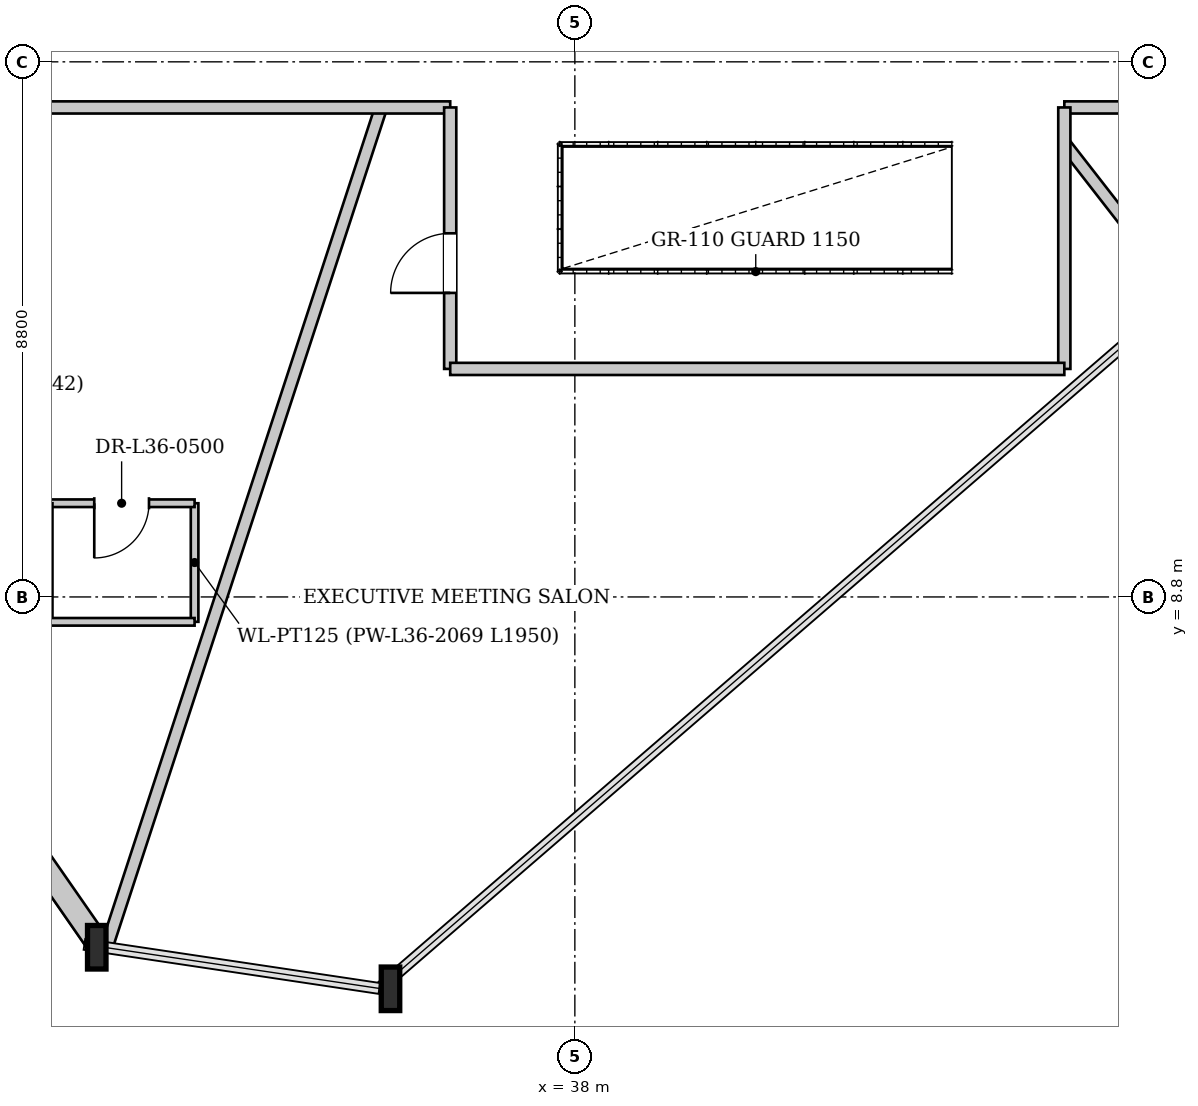
"""IFC4 building model, lengths in metres.
Left out: names, types, materials, properties, quantities, classifications, styles, units other than length and angle.
Written with IfcOpenShell. Run it as: python <this file> out.ifc"""

import sys

from ifc_helpers import new_model, si_unit, direction, frame, frame_2d, origin, origin_2d, place, context, subcontext, project, spatial, rectangle, i_section, extrude, source, transform, mapped, element, fill, save


model = new_model("IFC4")
c1 = context("Model", 3, precision=1e-05, world=origin(), true_north=direction((0.0, 1.0)))
c2 = subcontext(c1, "Body", "Model", "MODEL_VIEW")
j1 = project(units=[si_unit("LENGTHUNIT", "METRE"), si_unit("PLANEANGLEUNIT", "RADIAN")], contexts=[c1])
p1 = place(None, origin())
s1 = spatial("IfcSite", under=j1, at=p1, CompositionType="ELEMENT")
p2 = place(p1, origin())
s2 = spatial("IfcBuilding", under=s1, at=p2, CompositionType="ELEMENT")
p3 = place(p2, frame((0.0, 0.0, 138.1)))
s3 = spatial("IfcBuildingStorey", under=s2, at=p3, CompositionType="ELEMENT", Elevation=138.1)
m1 = source(origin(), c2, "Body", "SweptSolid", [
    extrude(i_section(OverallWidth=0.304, OverallDepth=0.716, WebThickness=0.021, FlangeThickness=0.04, at=origin_2d()), origin(), (0.0, 0.0, 1.0), 3.857),
])
p4 = place(p3, frame((29.934, 3.087, 0.0), z_axis=(0.105061568815, -0.02461984956, 0.99416091744), x_axis=(0.228156573902, 0.973624454184, 0.0)))
e1 = element("IfcColumn", 1, at=p4, inside=s3, PredefinedType="COLUMN", context=c2, shape_type="MappedRepresentation", body=[
    mapped(m1, transform((0.0, 0.0, 0.0), x_axis=(1.0, 0.0, 0.0), y_axis=(0.0, 1.0, 0.0), z_axis=(0.0, 0.0, 1.0), scale=1.0)),
])
m2 = source(origin(), c2, "Body", "SweptSolid", [
    extrude(i_section(OverallWidth=0.304, OverallDepth=0.716, WebThickness=0.021, FlangeThickness=0.04, at=origin_2d()), origin(), (0.0, 0.0, 1.0), 3.852),
])
p5 = place(p3, frame((34.785, 2.362, 0.0), z_axis=(0.094871440027, -0.003105344396, 0.995484689337), x_axis=(0.032714610528, 0.999464733874, 0.0)))
e2 = element("IfcColumn", 2, at=p5, inside=s3, PredefinedType="COLUMN", context=c2, shape_type="MappedRepresentation", body=[
    mapped(m2, transform((0.0, 0.0, 0.0), x_axis=(1.0, 0.0, 0.0), y_axis=(0.0, 1.0, 0.0), z_axis=(0.0, 0.0, 1.0), scale=1.0)),
])
p6 = place(p3, frame((30.09, 3.195, 0.0), z_axis=(0.0, 0.0, 1.0), x_axis=(-0.57033951124, 0.821409058824, 0.0)))
e3 = element("IfcWall", 3, at=p6, inside=s3, PredefinedType="SOLIDWALL", context=c2, shape_type="SweptSolid", body=[
    extrude(rectangle(XDim=18.042, YDim=0.38, at=frame_2d((9.021, 0.0))), origin(), (0.0, 0.0, 1.0), 2.972),
])
p7 = place(p6, frame((3.952, 0.0, 0.602)))
e4 = element("IfcOpeningElement", 4, at=p7, cuts=e3, PredefinedType="OPENING", context=c2, shape_type="SweptSolid", body=[
    extrude(rectangle(XDim=2.2, YDim=2.25, at=frame_2d((1.1, 1.125))), frame((0.0, 0.2, 0.0), z_axis=(0.0, -1.0, 0.0), x_axis=(1.0, 0.0, 0.0)), (0.0, 0.0, 1.0), 0.4),
])
p8 = place(p6, frame((11.89, 0.0, 0.602)))
e5 = element("IfcOpeningElement", 5, at=p8, cuts=e3, PredefinedType="OPENING", context=c2, shape_type="SweptSolid", body=[
    extrude(rectangle(XDim=2.2, YDim=2.25, at=frame_2d((1.1, 1.125))), frame((0.0, 0.2, 0.0), z_axis=(0.0, -1.0, 0.0), x_axis=(1.0, 0.0, 0.0)), (0.0, 0.0, 1.0), 0.4),
])
p9 = place(p3, frame((34.813, 16.85, 0.0), z_axis=(0.0, 0.0, 1.0), x_axis=(-0.31067365158, -0.95051663963, 0.0)))
e6 = element("IfcWall", 6, at=p9, inside=s3, PredefinedType="PARTITIONING", context=c2, shape_type="SweptSolid", body=[
    extrude(rectangle(XDim=14.507, YDim=0.2, at=frame_2d((7.253, 0.0))), origin(), (0.0, 0.0, 1.0), 3.075),
])
p10 = place(p3, frame((46.05, 16.259, 0.0), z_axis=(0.0, 0.0, 1.0), x_axis=(0.614254285098, -0.789108150533, 0.0)))
e7 = element("IfcWall", 7, at=p10, inside=s3, PredefinedType="PARTITIONING", context=c2, shape_type="SweptSolid", body=[
    extrude(rectangle(XDim=3.125, YDim=0.2, at=frame_2d((1.562, 0.0))), origin(), (0.0, 0.0, 1.0), 3.58),
])
p11 = place(p3, frame((31.746, 8.391, 0.0), z_axis=(0.0, 0.0, 1.0), x_axis=(0.0, 1.0, 0.0)))
e8 = element("IfcWall", 8, at=p11, inside=s3, PredefinedType="PARTITIONING", context=c2, shape_type="SweptSolid", body=[
    extrude(rectangle(XDim=1.95, YDim=0.125, at=frame_2d((0.975, 0.0))), origin(), (0.0, 0.0, 1.0), 3.58),
])
p12 = place(p3, frame((31.746, 10.341, 0.0), z_axis=(0.0, 0.0, 1.0), x_axis=(-1.0, 0.0, 0.0)))
e9 = element("IfcWall", 9, at=p12, inside=s3, PredefinedType="PARTITIONING", context=c2, shape_type="SweptSolid", body=[
    extrude(rectangle(XDim=2.4, YDim=0.125, at=frame_2d((1.2, 0.0))), origin(), (0.0, 0.0, 1.0), 3.58),
])
p13 = place(p12, frame((0.75, 0.0, 0.0)))
e10 = element("IfcOpeningElement", 10, at=p13, cuts=e9, PredefinedType="OPENING", context=c2, shape_type="SweptSolid", body=[
    extrude(rectangle(XDim=0.9, YDim=2.1, at=frame_2d((0.45, 1.05))), frame((0.0, 0.073, 0.0), z_axis=(0.0, -1.0, 0.0), x_axis=(1.0, 0.0, 0.0)), (0.0, 0.0, 1.0), 0.145),
])
p14 = place(p3, frame((29.346, 10.341, 0.0), z_axis=(0.0, 0.0, 1.0), x_axis=(0.0, -1.0, 0.0)))
e11 = element("IfcWall", 11, at=p14, inside=s3, PredefinedType="PARTITIONING", context=c2, shape_type="SweptSolid", body=[
    extrude(rectangle(XDim=1.95, YDim=0.125, at=frame_2d((0.975, 0.0))), origin(), (0.0, 0.0, 1.0), 3.58),
])
p15 = place(p3, frame((29.346, 8.391, 0.0), z_axis=(0.0, 0.0, 1.0), x_axis=(1.0, 0.0, 0.0)))
e12 = element("IfcWall", 12, at=p15, inside=s3, PredefinedType="PARTITIONING", context=c2, shape_type="SweptSolid", body=[
    extrude(rectangle(XDim=2.4, YDim=0.125, at=frame_2d((1.2, 0.0))), origin(), (0.0, 0.0, 1.0), 3.58),
])
p16 = place(p3, frame((27.45, 16.85, 0.0), z_axis=(0.0, 0.0, 1.0), x_axis=(1.0, 0.0, 0.0)))
e13 = element("IfcWall", 13, at=p16, inside=s3, PredefinedType="PARTITIONING", context=c2, shape_type="SweptSolid", body=[
    extrude(rectangle(XDim=8.5, YDim=0.2, at=frame_2d((4.25, 0.0))), origin(), (0.0, 0.0, 1.0), 3.58),
])
p17 = place(p16, frame((0.462, 0.0, 0.0)))
e14 = element("IfcOpeningElement", 14, at=p17, cuts=e13, PredefinedType="OPENING", context=c2, shape_type="SweptSolid", body=[
    extrude(rectangle(XDim=0.98, YDim=2.15, at=frame_2d((0.49, 1.075))), frame((0.0, 0.11, 0.0), z_axis=(0.0, -1.0, 0.0), x_axis=(1.0, 0.0, 0.0)), (0.0, 0.0, 1.0), 0.22),
])
p18 = place(p3, frame((46.05, 16.85, 0.0), z_axis=(0.0, 0.0, 1.0), x_axis=(1.0, 0.0, 0.0)))
e15 = element("IfcWall", 15, at=p18, inside=s3, PredefinedType="PARTITIONING", context=c2, shape_type="SweptSolid", body=[
    extrude(rectangle(XDim=2.5, YDim=0.2, at=frame_2d((1.25, 0.0))), origin(), (0.0, 0.0, 1.0), 3.58),
])
p19 = place(p18, frame((1.22, 0.0, 0.0)))
e16 = element("IfcOpeningElement", 16, at=p19, cuts=e15, PredefinedType="OPENING", context=c2, shape_type="SweptSolid", body=[
    extrude(rectangle(XDim=0.98, YDim=2.15, at=frame_2d((0.49, 1.075))), frame((0.0, 0.11, 0.0), z_axis=(0.0, -1.0, 0.0), x_axis=(1.0, 0.0, 0.0)), (0.0, 0.0, 1.0), 0.22),
])
p20 = place(p3, frame((35.95, 12.55, 0.0), z_axis=(0.0, 0.0, 1.0), x_axis=(0.0, 1.0, 0.0)))
e17 = element("IfcWall", 17, at=p20, inside=s3, PredefinedType="PARTITIONING", context=c2, shape_type="SweptSolid", body=[
    extrude(rectangle(XDim=4.3, YDim=0.2, at=frame_2d((2.15, 0.0))), origin(), (0.0, 0.0, 1.0), 3.58),
])
p21 = place(p20, frame((1.25, 0.0, 0.0)))
e18 = element("IfcOpeningElement", 18, at=p21, cuts=e17, PredefinedType="OPENING", context=c2, shape_type="SweptSolid", body=[
    extrude(rectangle(XDim=0.98, YDim=2.15, at=frame_2d((0.49, 1.075))), frame((0.0, 0.11, 0.0), z_axis=(0.0, -1.0, 0.0), x_axis=(1.0, 0.0, 0.0)), (0.0, 0.0, 1.0), 0.22),
])
p22 = place(p3, frame((46.05, 12.55, 0.0), z_axis=(0.0, 0.0, 1.0), x_axis=(0.0, 1.0, 0.0)))
e19 = element("IfcWall", 19, at=p22, inside=s3, PredefinedType="PARTITIONING", context=c2, shape_type="SweptSolid", body=[
    extrude(rectangle(XDim=4.3, YDim=0.2, at=frame_2d((2.15, 0.0))), origin(), (0.0, 0.0, 1.0), 3.58),
])
p23 = place(p3, frame((35.95, 12.55, 0.0), z_axis=(0.0, 0.0, 1.0), x_axis=(1.0, 0.0, 0.0)))
e20 = element("IfcWall", 20, at=p23, inside=s3, PredefinedType="PARTITIONING", context=c2, shape_type="SweptSolid", body=[
    extrude(rectangle(XDim=10.1, YDim=0.2, at=frame_2d((5.05, 0.0))), origin(), (0.0, 0.0, 1.0), 3.58),
])
m3 = source(origin(), c2, "Body", "SweptSolid", [
    extrude(rectangle(XDim=0.9, YDim=2.1, at=frame_2d((0.45, 1.05))), frame((0.0, 0.025, 0.0), z_axis=(0.0, -1.0, 0.0), x_axis=(1.0, 0.0, 0.0)), (0.0, 0.0, 1.0), 0.05),
])
p24 = place(p13, origin())
e21 = element("IfcDoor", 21, at=p24, inside=s3, OperationType="SINGLE_SWING_RIGHT", PredefinedType="DOOR", context=c2, shape_type="MappedRepresentation", body=[
    mapped(m3, transform((0.0, 0.0, 0.0), x_axis=(1.0, 0.0, 0.0), y_axis=(0.0, 1.0, 0.0), z_axis=(0.0, 0.0, 1.0), scale=1.0)),
])
fill(e10, e21)
m4 = source(origin(), c2, "Body", "SweptSolid", [
    extrude(rectangle(XDim=0.98, YDim=2.15, at=frame_2d((0.49, 1.075))), frame((0.0, 0.025, 0.0), z_axis=(0.0, -1.0, 0.0), x_axis=(1.0, 0.0, 0.0)), (0.0, 0.0, 1.0), 0.05),
])
p25 = place(p21, origin())
e22 = element("IfcDoor", 22, at=p25, inside=s3, OperationType="SINGLE_SWING_LEFT", PredefinedType="DOOR", context=c2, shape_type="MappedRepresentation", body=[
    mapped(m4, transform((0.0, 0.0, 0.0), x_axis=(1.0, 0.0, 0.0), y_axis=(0.0, 1.0, 0.0), z_axis=(0.0, 0.0, 1.0), scale=1.0)),
])
fill(e18, e22)
save(model, sys.argv[1])
